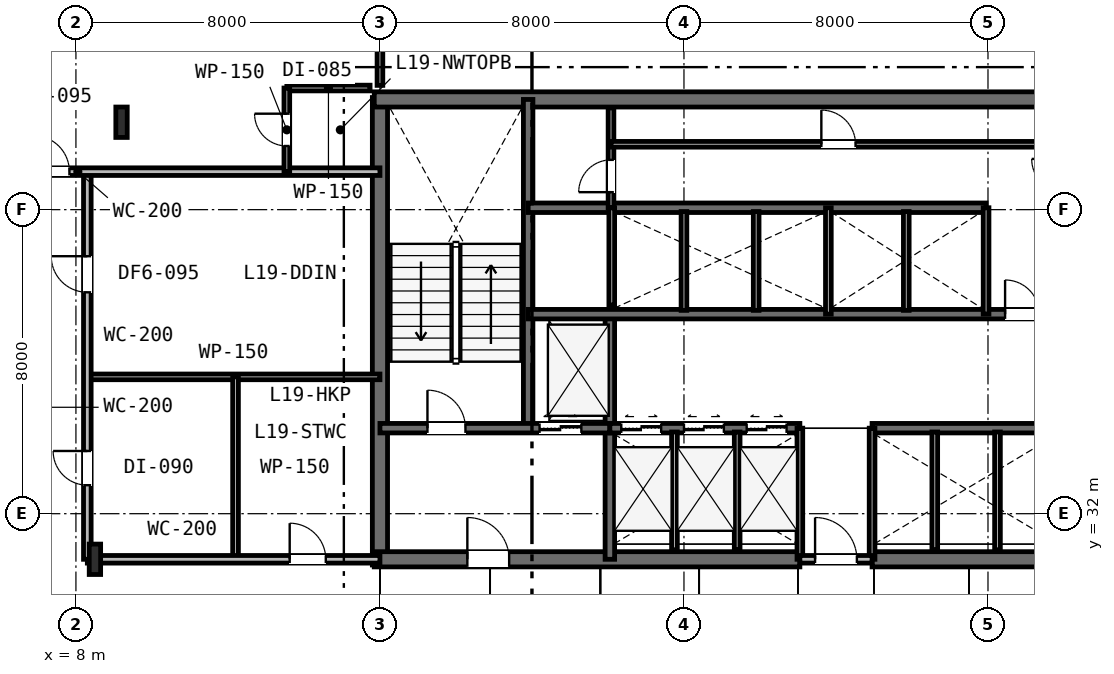
"""IFC4 building model, lengths in metres.
Left out: names, types, materials, properties, quantities, classifications, styles, units other than length and angle.
Written with IfcOpenShell. Run it as: python <this file> out.ifc"""

import sys

from ifc_helpers import new_model, si_unit, direction, frame, frame_2d, origin, origin_2d, place, context, subcontext, project, spatial, rectangle, i_section, extrude, element, fill, save


model = new_model("IFC4")
c1 = context("Model", 3, precision=1e-05, world=origin(), true_north=direction((0.0, 1.0)))
c2 = subcontext(c1, "Body", "Model", "MODEL_VIEW")
j1 = project(units=[si_unit("LENGTHUNIT", "METRE"), si_unit("PLANEANGLEUNIT", "RADIAN")], contexts=[c1])
p1 = place(None, origin())
s1 = spatial("IfcSite", under=j1, at=p1, CompositionType="ELEMENT")
p2 = place(p1, origin())
s2 = spatial("IfcBuilding", under=s1, at=p2, CompositionType="ELEMENT")
p3 = place(p2, frame((0.0, 0.0, 76.2)))
s3 = spatial("IfcBuildingStorey", under=s2, at=p3, CompositionType="ELEMENT", Elevation=76.2)
p4 = place(p3, frame((16.0, 30.65, 0.0), z_axis=(0.0, 0.0, 1.0), x_axis=(0.0, 1.0, 0.0)))
e1 = element("IfcWall", 1, at=p4, inside=s3, PredefinedType="SHEAR", context=c2, shape_type="SweptSolid", body=[
    extrude(rectangle(XDim=12.3, YDim=0.4, at=frame_2d((6.15, 0.0))), origin(), (0.0, 0.0, 1.0), 3.6),
])
p5 = place(p3, frame((15.85, 42.9, 0.0), z_axis=(0.0, 0.0, 1.0), x_axis=(1.0, 0.0, 0.0)))
e2 = element("IfcWall", 2, at=p5, inside=s3, PredefinedType="SHEAR", context=c2, shape_type="SweptSolid", body=[
    extrude(rectangle(XDim=24.3, YDim=0.4, at=frame_2d((12.15, 0.0))), origin(), (0.0, 0.0, 1.0), 3.6),
])
p6 = place(p3, frame((15.85, 30.8, 0.0), z_axis=(0.0, 0.0, 1.0), x_axis=(1.0, 0.0, 0.0)))
e3 = element("IfcWall", 3, at=p6, inside=s3, PredefinedType="SHEAR", context=c2, shape_type="SweptSolid", body=[
    extrude(rectangle(XDim=11.2, YDim=0.4, at=frame_2d((5.6, 0.0))), origin(), (0.0, 0.0, 1.0), 3.6),
])
p7 = place(p6, frame((2.45, 0.0, 0.0)))
e4 = element("IfcOpeningElement", 4, at=p7, cuts=e3, PredefinedType="OPENING", context=c2, shape_type="SweptSolid", body=[
    extrude(rectangle(XDim=1.1, YDim=2.15, at=frame_2d((0.55, 1.075))), frame((0.0, 0.21, 0.0), z_axis=(0.0, -1.0, 0.0), x_axis=(1.0, 0.0, 0.0)), (0.0, 0.0, 1.0), 0.42),
])
p8 = place(p3, frame((28.95, 30.8, 0.0), z_axis=(0.0, 0.0, 1.0), x_axis=(1.0, 0.0, 0.0)))
e5 = element("IfcWall", 5, at=p8, inside=s3, PredefinedType="SHEAR", context=c2, shape_type="SweptSolid", body=[
    extrude(rectangle(XDim=11.2, YDim=0.4, at=frame_2d((5.6, 0.0))), origin(), (0.0, 0.0, 1.0), 3.6),
])
p9 = place(p8, frame((7.65, 0.0, 0.0)))
e6 = element("IfcOpeningElement", 6, at=p9, cuts=e5, PredefinedType="OPENING", context=c2, shape_type="SweptSolid", body=[
    extrude(rectangle(XDim=1.1, YDim=2.15, at=frame_2d((0.55, 1.075))), frame((0.0, 0.21, 0.0), z_axis=(0.0, -1.0, 0.0), x_axis=(1.0, 0.0, 0.0)), (0.0, 0.0, 1.0), 0.42),
])
p10 = place(p3, frame((19.9, 34.25, 0.0), z_axis=(0.0, 0.0, 1.0), x_axis=(0.0, 1.0, 0.0)))
e7 = element("IfcWall", 7, at=p10, inside=s3, PredefinedType="SHEAR", context=c2, shape_type="SweptSolid", body=[
    extrude(rectangle(XDim=8.65, YDim=0.25, at=frame_2d((4.325, 0.0))), origin(), (0.0, 0.0, 1.0), 3.6),
])
p11 = place(p3, frame((22.05, 30.8, 0.0), z_axis=(0.0, 0.0, 1.0), x_axis=(0.0, 1.0, 0.0)))
e8 = element("IfcWall", 8, at=p11, inside=s3, PredefinedType="SHEAR", context=c2, shape_type="SweptSolid", body=[
    extrude(rectangle(XDim=6.45, YDim=0.25, at=frame_2d((3.225, 0.0))), origin(), (0.0, 0.0, 1.0), 3.6),
])
p12 = place(p3, frame((16.0, 34.25, 0.0), z_axis=(0.0, 0.0, 1.0), x_axis=(1.0, 0.0, 0.0)))
e9 = element("IfcWall", 9, at=p12, inside=s3, PredefinedType="SHEAR", context=c2, shape_type="SweptSolid", body=[
    extrude(rectangle(XDim=6.05, YDim=0.25, at=frame_2d((3.025, 0.0))), origin(), (0.0, 0.0, 1.0), 3.6),
])
p13 = place(p12, frame((1.25, 0.0, 0.0)))
e10 = element("IfcOpeningElement", 10, at=p13, cuts=e9, PredefinedType="OPENING", context=c2, shape_type="SweptSolid", body=[
    extrude(rectangle(XDim=1.0, YDim=2.15, at=frame_2d((0.5, 1.075))), frame((0.0, 0.135, 0.0), z_axis=(0.0, -1.0, 0.0), x_axis=(1.0, 0.0, 0.0)), (0.0, 0.0, 1.0), 0.27),
])
p14 = place(p12, frame((4.2, 0.0, 0.0)))
e11 = element("IfcOpeningElement", 11, at=p14, cuts=e9, PredefinedType="OPENING", context=c2, shape_type="SweptSolid", body=[
    extrude(rectangle(XDim=1.1, YDim=2.15, at=frame_2d((0.55, 1.075))), frame((0.0, 0.135, 0.0), z_axis=(0.0, -1.0, 0.0), x_axis=(1.0, 0.0, 0.0)), (0.0, 0.0, 1.0), 0.27),
])
p15 = place(p3, frame((22.05, 34.25, 0.0), z_axis=(0.0, 0.0, 1.0), x_axis=(1.0, 0.0, 0.0)))
e12 = element("IfcWall", 12, at=p15, inside=s3, PredefinedType="SHEAR", context=c2, shape_type="SweptSolid", body=[
    extrude(rectangle(XDim=5.0, YDim=0.25, at=frame_2d((2.5, 0.0))), origin(), (0.0, 0.0, 1.0), 3.6),
])
p16 = place(p15, frame((0.3, 0.0, 0.0)))
e13 = element("IfcOpeningElement", 13, at=p16, cuts=e12, PredefinedType="OPENING", context=c2, shape_type="SweptSolid", body=[
    extrude(rectangle(XDim=1.05, YDim=2.15, at=frame_2d((0.525, 1.075))), frame((0.0, 0.135, 0.0), z_axis=(0.0, -1.0, 0.0), x_axis=(1.0, 0.0, 0.0)), (0.0, 0.0, 1.0), 0.27),
])
p17 = place(p15, frame((1.95, 0.0, 0.0)))
e14 = element("IfcOpeningElement", 14, at=p17, cuts=e12, PredefinedType="OPENING", context=c2, shape_type="SweptSolid", body=[
    extrude(rectangle(XDim=1.05, YDim=2.15, at=frame_2d((0.525, 1.075))), frame((0.0, 0.135, 0.0), z_axis=(0.0, -1.0, 0.0), x_axis=(1.0, 0.0, 0.0)), (0.0, 0.0, 1.0), 0.27),
])
p18 = place(p15, frame((3.6, 0.0, 0.0)))
e15 = element("IfcOpeningElement", 15, at=p18, cuts=e12, PredefinedType="OPENING", context=c2, shape_type="SweptSolid", body=[
    extrude(rectangle(XDim=1.05, YDim=2.15, at=frame_2d((0.525, 1.075))), frame((0.0, 0.135, 0.0), z_axis=(0.0, -1.0, 0.0), x_axis=(1.0, 0.0, 0.0)), (0.0, 0.0, 1.0), 0.27),
])
p19 = place(p3, frame((28.95, 34.25, 0.0), z_axis=(0.0, 0.0, 1.0), x_axis=(1.0, 0.0, 0.0)))
e16 = element("IfcWall", 16, at=p19, inside=s3, PredefinedType="SHEAR", context=c2, shape_type="SweptSolid", body=[
    extrude(rectangle(XDim=5.0, YDim=0.25, at=frame_2d((2.5, 0.0))), origin(), (0.0, 0.0, 1.0), 3.6),
])
p20 = place(p3, frame((19.9, 37.25, 0.0), z_axis=(0.0, 0.0, 1.0), x_axis=(1.0, 0.0, 0.0)))
e17 = element("IfcWall", 17, at=p20, inside=s3, PredefinedType="SHEAR", context=c2, shape_type="SweptSolid", body=[
    extrude(rectangle(XDim=16.2, YDim=0.25, at=frame_2d((8.1, 0.0))), origin(), (0.0, 0.0, 1.0), 3.6),
])
p21 = place(p20, frame((12.55, 0.0, 0.0)))
e18 = element("IfcOpeningElement", 18, at=p21, cuts=e17, PredefinedType="OPENING", context=c2, shape_type="SweptSolid", body=[
    extrude(rectangle(XDim=0.9, YDim=2.15, at=frame_2d((0.45, 1.075))), frame((0.0, 0.135, 0.0), z_axis=(0.0, -1.0, 0.0), x_axis=(1.0, 0.0, 0.0)), (0.0, 0.0, 1.0), 0.27),
])
p22 = place(p3, frame((19.9, 40.05, 0.0), z_axis=(0.0, 0.0, 1.0), x_axis=(1.0, 0.0, 0.0)))
e19 = element("IfcWall", 19, at=p22, inside=s3, PredefinedType="SHEAR", context=c2, shape_type="SweptSolid", body=[
    extrude(rectangle(XDim=12.05, YDim=0.25, at=frame_2d((6.025, 0.0))), origin(), (0.0, 0.0, 1.0), 3.6),
])
for number, where, z_axis, x_axis in (
    (20, (8.5, 30.8, 0.0), (0.0, 0.0, 1.0), (1.0, 0.0, 0.0)),
    (21, (9.2, 42.3, 0.0), (0.0, 0.0, 1.0), (1.0, 0.0, 0.0)),
):
    element("IfcColumn", number, at=place(p3, frame(where, z_axis=z_axis, x_axis=x_axis)), inside=s3, PredefinedType="COLUMN", context=c2, shape_type="SweptSolid", body=[
        extrude(i_section(OverallWidth=0.3, OverallDepth=0.8, WebThickness=0.018, FlangeThickness=0.033, FilletRadius=0.03, at=origin_2d()), origin(), (0.0, 0.0, 1.0), 3.6),
    ])
for number, where, z_axis, x_axis in (
    (22, (27.05, 30.8, 0.0), (0.0, 0.0, 1.0), (0.0, 1.0, 0.0)),
    (23, (28.95, 30.8, 0.0), (0.0, 0.0, 1.0), (0.0, 1.0, 0.0)),
):
    element("IfcWall", number, at=place(p3, frame(where, z_axis=z_axis, x_axis=x_axis)), inside=s3, PredefinedType="PLUMBINGWALL", context=c2, shape_type="SweptSolid", body=[
        extrude(rectangle(XDim=3.45, YDim=0.15, at=frame_2d((1.725, 0.0))), origin(), (0.0, 0.0, 1.0), 3.24),
    ])
p23 = place(p3, frame((27.05, 30.8, 0.0), z_axis=(0.0, 0.0, 1.0), x_axis=(1.0, 0.0, 0.0)))
e24 = element("IfcWall", 24, at=p23, inside=s3, PredefinedType="PARTITIONING", context=c2, shape_type="SweptSolid", body=[
    extrude(rectangle(XDim=1.9, YDim=0.2, at=frame_2d((0.95, 0.0))), origin(), (0.0, 0.0, 1.0), 3.24),
])
p24 = place(p23, frame((0.4, 0.0, 0.0)))
e25 = element("IfcOpeningElement", 25, at=p24, cuts=e24, PredefinedType="OPENING", context=c2, shape_type="SweptSolid", body=[
    extrude(rectangle(XDim=1.1, YDim=2.15, at=frame_2d((0.55, 1.075))), frame((0.0, 0.11, 0.0), z_axis=(0.0, -1.0, 0.0), x_axis=(1.0, 0.0, 0.0)), (0.0, 0.0, 1.0), 0.22),
])
for number, where, z_axis, x_axis in (
    (26, (23.75, 31.05, 0.0), (0.0, 0.0, 1.0), (0.0, 1.0, 0.0)),
    (27, (25.4, 31.05, 0.0), (0.0, 0.0, 1.0), (0.0, 1.0, 0.0)),
    (28, (30.6, 31.05, 0.0), (0.0, 0.0, 1.0), (0.0, 1.0, 0.0)),
    (29, (32.25, 31.05, 0.0), (0.0, 0.0, 1.0), (0.0, 1.0, 0.0)),
):
    element("IfcWall", number, at=place(p3, frame(where, z_axis=z_axis, x_axis=x_axis)), inside=s3, PredefinedType="PLUMBINGWALL", context=c2, shape_type="SweptSolid", body=[
        extrude(rectangle(XDim=3.1, YDim=0.15, at=frame_2d((1.55, 0.0))), origin(), (0.0, 0.0, 1.0), 3.24),
    ])
p25 = place(p3, frame((22.1, 37.49, 0.0), z_axis=(0.0, 0.0, 1.0), x_axis=(0.0, 1.0, 0.0)))
e30 = element("IfcWall", 30, at=p25, inside=s3, PredefinedType="PLUMBINGWALL", context=c2, shape_type="SweptSolid", body=[
    extrude(rectangle(XDim=2.56, YDim=0.15, at=frame_2d((1.28, 0.0))), origin(), (0.0, 0.0, 1.0), 3.24),
])
p26 = place(p3, frame((27.8, 37.25, 0.0), z_axis=(0.0, 0.0, 1.0), x_axis=(0.0, 1.0, 0.0)))
e31 = element("IfcWall", 31, at=p26, inside=s3, PredefinedType="PLUMBINGWALL", context=c2, shape_type="SweptSolid", body=[
    extrude(rectangle(XDim=2.8, YDim=0.15, at=frame_2d((1.4, 0.0))), origin(), (0.0, 0.0, 1.0), 3.24),
])
for number, where, z_axis, x_axis in (
    (32, (24.0, 37.35, 0.0), (0.0, 0.0, 1.0), (0.0, 1.0, 0.0)),
    (33, (25.9, 37.35, 0.0), (0.0, 0.0, 1.0), (0.0, 1.0, 0.0)),
):
    element("IfcWall", number, at=place(p3, frame(where, z_axis=z_axis, x_axis=x_axis)), inside=s3, PredefinedType="PLUMBINGWALL", context=c2, shape_type="SweptSolid", body=[
        extrude(rectangle(XDim=2.6, YDim=0.15, at=frame_2d((1.3, 0.0))), origin(), (0.0, 0.0, 1.0), 3.24),
    ])
p27 = place(p3, frame((31.95, 37.25, 0.0), z_axis=(0.0, 0.0, 1.0), x_axis=(0.0, 1.0, 0.0)))
e34 = element("IfcWall", 34, at=p27, inside=s3, PredefinedType="PLUMBINGWALL", context=c2, shape_type="SweptSolid", body=[
    extrude(rectangle(XDim=2.8, YDim=0.15, at=frame_2d((1.4, 0.0))), origin(), (0.0, 0.0, 1.0), 3.24),
])
p28 = place(p3, frame((29.85, 37.35, 0.0), z_axis=(0.0, 0.0, 1.0), x_axis=(0.0, 1.0, 0.0)))
e35 = element("IfcWall", 35, at=p28, inside=s3, PredefinedType="PLUMBINGWALL", context=c2, shape_type="SweptSolid", body=[
    extrude(rectangle(XDim=2.6, YDim=0.15, at=frame_2d((1.3, 0.0))), origin(), (0.0, 0.0, 1.0), 3.24),
])
p29 = place(p3, frame((22.08, 40.05, 0.0), z_axis=(0.0, 0.0, 1.0), x_axis=(0.0, 1.0, 0.0)))
e36 = element("IfcWall", 36, at=p29, inside=s3, PredefinedType="PARTITIONING", context=c2, shape_type="SweptSolid", body=[
    extrude(rectangle(XDim=2.63, YDim=0.15, at=frame_2d((1.315, 0.0))), origin(), (0.0, 0.0, 1.0), 3.24),
])
p30 = place(p29, frame((0.41, 0.0, 0.0)))
e37 = element("IfcOpeningElement", 37, at=p30, cuts=e36, PredefinedType="OPENING", context=c2, shape_type="SweptSolid", body=[
    extrude(rectangle(XDim=0.85, YDim=2.15, at=frame_2d((0.425, 1.075))), frame((0.0, 0.085, 0.0), z_axis=(0.0, -1.0, 0.0), x_axis=(1.0, 0.0, 0.0)), (0.0, 0.0, 1.0), 0.17),
])
p31 = place(p3, frame((22.08, 41.72, 0.0), z_axis=(0.0, 0.0, 1.0), x_axis=(1.0, 0.0, 0.0)))
e38 = element("IfcWall", 38, at=p31, inside=s3, PredefinedType="PARTITIONING", context=c2, shape_type="SweptSolid", body=[
    extrude(rectangle(XDim=11.97, YDim=0.15, at=frame_2d((5.985, 0.0))), origin(), (0.0, 0.0, 1.0), 3.24),
])
p32 = place(p31, frame((5.535, 0.0, 0.0)))
e39 = element("IfcOpeningElement", 39, at=p32, cuts=e38, PredefinedType="OPENING", context=c2, shape_type="SweptSolid", body=[
    extrude(rectangle(XDim=0.9, YDim=2.15, at=frame_2d((0.45, 1.075))), frame((0.0, 0.085, 0.0), z_axis=(0.0, -1.0, 0.0), x_axis=(1.0, 0.0, 0.0)), (0.0, 0.0, 1.0), 0.17),
])
p33 = place(p3, frame((8.3, 35.6, 0.0), z_axis=(0.0, 0.0, 1.0), x_axis=(1.0, 0.0, 0.0)))
e40 = element("IfcWall", 40, at=p33, inside=s3, PredefinedType="PARTITIONING", context=c2, shape_type="SweptSolid", body=[
    extrude(rectangle(XDim=7.7, YDim=0.15, at=frame_2d((3.85, 0.0))), origin(), (0.0, 0.0, 1.0), 2.74),
])
p34 = place(p3, frame((12.2, 30.8, 0.0), z_axis=(0.0, 0.0, 1.0), x_axis=(0.0, 1.0, 0.0)))
e41 = element("IfcWall", 41, at=p34, inside=s3, PredefinedType="PARTITIONING", context=c2, shape_type="SweptSolid", body=[
    extrude(rectangle(XDim=4.8, YDim=0.15, at=frame_2d((2.4, 0.0))), origin(), (0.0, 0.0, 1.0), 2.74),
])
p35 = place(p3, frame((8.3, 30.8, 0.0), z_axis=(0.0, 0.0, 1.0), x_axis=(1.0, 0.0, 0.0)))
e42 = element("IfcWall", 42, at=p35, inside=s3, PredefinedType="PARTITIONING", context=c2, shape_type="SweptSolid", body=[
    extrude(rectangle(XDim=7.7, YDim=0.2, at=frame_2d((3.85, 0.0))), origin(), (0.0, 0.0, 1.0), 2.74),
])
p36 = place(p35, frame((5.325, 0.0, 0.0)))
e43 = element("IfcOpeningElement", 43, at=p36, cuts=e42, PredefinedType="OPENING", context=c2, shape_type="SweptSolid", body=[
    extrude(rectangle(XDim=0.95, YDim=2.15, at=frame_2d((0.475, 1.075))), frame((0.0, 0.11, 0.0), z_axis=(0.0, -1.0, 0.0), x_axis=(1.0, 0.0, 0.0)), (0.0, 0.0, 1.0), 0.22),
])
p37 = place(p3, frame((8.3, 30.8, 0.0), z_axis=(0.0, 0.0, 1.0), x_axis=(0.0, 1.0, 0.0)))
e44 = element("IfcWall", 44, at=p37, inside=s3, PredefinedType="PARTITIONING", context=c2, shape_type="SweptSolid", body=[
    extrude(rectangle(XDim=10.2, YDim=0.2, at=frame_2d((5.1, 0.0))), origin(), (0.0, 0.0, 1.0), 2.74),
])
p38 = place(p37, frame((1.95, 0.0, 0.0)))
e45 = element("IfcOpeningElement", 45, at=p38, cuts=e44, PredefinedType="OPENING", context=c2, shape_type="SweptSolid", body=[
    extrude(rectangle(XDim=0.9, YDim=2.15, at=frame_2d((0.45, 1.075))), frame((0.0, 0.11, 0.0), z_axis=(0.0, -1.0, 0.0), x_axis=(1.0, 0.0, 0.0)), (0.0, 0.0, 1.0), 0.22),
])
p39 = place(p37, frame((7.025, 0.0, 0.0)))
e46 = element("IfcOpeningElement", 46, at=p39, cuts=e44, PredefinedType="OPENING", context=c2, shape_type="SweptSolid", body=[
    extrude(rectangle(XDim=0.95, YDim=2.15, at=frame_2d((0.475, 1.075))), frame((0.0, 0.11, 0.0), z_axis=(0.0, -1.0, 0.0), x_axis=(1.0, 0.0, 0.0)), (0.0, 0.0, 1.0), 0.22),
])
p40 = place(p3, frame((0.1, 41.0, 0.0), z_axis=(0.0, 0.0, 1.0), x_axis=(1.0, 0.0, 0.0)))
e47 = element("IfcWall", 47, at=p40, inside=s3, PredefinedType="PARTITIONING", context=c2, shape_type="SweptSolid", body=[
    extrude(rectangle(XDim=15.9, YDim=0.2, at=frame_2d((7.95, 0.0))), origin(), (0.0, 0.0, 1.0), 2.74),
])
p41 = place(p40, frame((6.779, 0.0, 0.0)))
e48 = element("IfcOpeningElement", 48, at=p41, cuts=e47, PredefinedType="OPENING", context=c2, shape_type="SweptSolid", body=[
    extrude(rectangle(XDim=0.95, YDim=2.15, at=frame_2d((0.475, 1.075))), frame((0.0, 0.11, 0.0), z_axis=(0.0, -1.0, 0.0), x_axis=(1.0, 0.0, 0.0)), (0.0, 0.0, 1.0), 0.22),
])
p42 = place(p3, frame((13.55, 43.2, 0.0), z_axis=(0.0, 0.0, 1.0), x_axis=(1.0, 0.0, 0.0)))
e49 = element("IfcWall", 49, at=p42, inside=s3, PredefinedType="PARTITIONING", context=c2, shape_type="SweptSolid", body=[
    extrude(rectangle(XDim=2.19, YDim=0.15, at=frame_2d((1.095, 0.0))), origin(), (0.0, 0.0, 1.0), 3.24),
])
p43 = place(p3, frame((13.55, 41.0, 0.0), z_axis=(0.0, 0.0, 1.0), x_axis=(0.0, 1.0, 0.0)))
e50 = element("IfcWall", 50, at=p43, inside=s3, PredefinedType="PARTITIONING", context=c2, shape_type="SweptSolid", body=[
    extrude(rectangle(XDim=2.2, YDim=0.15, at=frame_2d((1.1, 0.0))), origin(), (0.0, 0.0, 1.0), 3.24),
])
p44 = place(p43, frame((0.675, 0.0, 0.0)))
e51 = element("IfcOpeningElement", 51, at=p44, cuts=e50, PredefinedType="OPENING", context=c2, shape_type="SweptSolid", body=[
    extrude(rectangle(XDim=0.85, YDim=2.15, at=frame_2d((0.425, 1.075))), frame((0.0, 0.085, 0.0), z_axis=(0.0, -1.0, 0.0), x_axis=(1.0, 0.0, 0.0)), (0.0, 0.0, 1.0), 0.17),
])
p45 = place(p3, frame((16.0, 43.27, 0.0), z_axis=(0.0, 0.0, 1.0), x_axis=(0.0, 1.0, 0.0)))
e52 = element("IfcWall", 52, at=p45, inside=s3, PredefinedType="PARTITIONING", context=c2, shape_type="SweptSolid", body=[
    extrude(rectangle(XDim=4.63, YDim=0.15, at=frame_2d((2.315, 0.0))), origin(), (0.0, 0.0, 1.0), 2.83),
])
p46 = place(p24, origin())
e53 = element("IfcDoor", 53, at=p46, inside=s3, OperationType="SINGLE_SWING_LEFT", PredefinedType="DOOR", context=c2, shape_type="SweptSolid", body=[
    extrude(rectangle(XDim=1.1, YDim=2.15, at=frame_2d((0.55, 1.075))), frame((0.0, 0.025, 0.0), z_axis=(0.0, -1.0, 0.0), x_axis=(1.0, 0.0, 0.0)), (0.0, 0.0, 1.0), 0.05),
])
fill(e25, e53)
p47 = place(p13, origin())
e54 = element("IfcDoor", 54, at=p47, inside=s3, OperationType="SINGLE_SWING_LEFT", PredefinedType="DOOR", context=c2, shape_type="SweptSolid", body=[
    extrude(rectangle(XDim=1.0, YDim=2.15, at=frame_2d((0.5, 1.075))), frame((0.0, 0.025, 0.0), z_axis=(0.0, -1.0, 0.0), x_axis=(1.0, 0.0, 0.0)), (0.0, 0.0, 1.0), 0.05),
])
fill(e10, e54)
p48 = place(p7, origin())
e55 = element("IfcDoor", 55, at=p48, inside=s3, OperationType="SINGLE_SWING_LEFT", PredefinedType="DOOR", context=c2, shape_type="SweptSolid", body=[
    extrude(rectangle(XDim=1.1, YDim=2.15, at=frame_2d((0.55, 1.075))), frame((0.0, 0.025, 0.0), z_axis=(0.0, -1.0, 0.0), x_axis=(1.0, 0.0, 0.0)), (0.0, 0.0, 1.0), 0.05),
])
fill(e4, e55)
p49 = place(p21, origin())
e56 = element("IfcDoor", 56, at=p49, inside=s3, OperationType="SINGLE_SWING_LEFT", PredefinedType="DOOR", context=c2, shape_type="SweptSolid", body=[
    extrude(rectangle(XDim=0.9, YDim=2.15, at=frame_2d((0.45, 1.075))), frame((0.0, 0.025, 0.0), z_axis=(0.0, -1.0, 0.0), x_axis=(1.0, 0.0, 0.0)), (0.0, 0.0, 1.0), 0.05),
])
fill(e18, e56)
p50 = place(p30, origin())
e57 = element("IfcDoor", 57, at=p50, inside=s3, OperationType="SINGLE_SWING_LEFT", PredefinedType="DOOR", context=c2, shape_type="SweptSolid", body=[
    extrude(rectangle(XDim=0.85, YDim=2.15, at=frame_2d((0.425, 1.075))), frame((0.0, 0.025, 0.0), z_axis=(0.0, -1.0, 0.0), x_axis=(1.0, 0.0, 0.0)), (0.0, 0.0, 1.0), 0.05),
])
fill(e37, e57)
p51 = place(p32, origin())
e58 = element("IfcDoor", 58, at=p51, inside=s3, OperationType="SINGLE_SWING_LEFT", PredefinedType="DOOR", context=c2, shape_type="SweptSolid", body=[
    extrude(rectangle(XDim=0.9, YDim=2.15, at=frame_2d((0.45, 1.075))), frame((0.0, 0.025, 0.0), z_axis=(0.0, -1.0, 0.0), x_axis=(1.0, 0.0, 0.0)), (0.0, 0.0, 1.0), 0.05),
])
fill(e39, e58)
p52 = place(p36, origin())
e59 = element("IfcDoor", 59, at=p52, inside=s3, OperationType="SINGLE_SWING_LEFT", PredefinedType="DOOR", context=c2, shape_type="SweptSolid", body=[
    extrude(rectangle(XDim=0.95, YDim=2.15, at=frame_2d((0.475, 1.075))), frame((0.0, 0.025, 0.0), z_axis=(0.0, -1.0, 0.0), x_axis=(1.0, 0.0, 0.0)), (0.0, 0.0, 1.0), 0.05),
])
fill(e43, e59)
p53 = place(p38, origin())
e60 = element("IfcDoor", 60, at=p53, inside=s3, OperationType="SINGLE_SWING_RIGHT", PredefinedType="DOOR", context=c2, shape_type="SweptSolid", body=[
    extrude(rectangle(XDim=0.9, YDim=2.15, at=frame_2d((0.45, 1.075))), frame((0.0, 0.025, 0.0), z_axis=(0.0, -1.0, 0.0), x_axis=(1.0, 0.0, 0.0)), (0.0, 0.0, 1.0), 0.05),
])
fill(e45, e60)
p54 = place(p41, origin())
e61 = element("IfcDoor", 61, at=p54, inside=s3, OperationType="SINGLE_SWING_LEFT", PredefinedType="DOOR", context=c2, shape_type="SweptSolid", body=[
    extrude(rectangle(XDim=0.95, YDim=2.15, at=frame_2d((0.475, 1.075))), frame((0.0, 0.025, 0.0), z_axis=(0.0, -1.0, 0.0), x_axis=(1.0, 0.0, 0.0)), (0.0, 0.0, 1.0), 0.05),
])
fill(e48, e61)
p55 = place(p44, origin())
e62 = element("IfcDoor", 62, at=p55, inside=s3, OperationType="SINGLE_SWING_RIGHT", PredefinedType="DOOR", context=c2, shape_type="SweptSolid", body=[
    extrude(rectangle(XDim=0.85, YDim=2.15, at=frame_2d((0.425, 1.075))), frame((0.0, 0.025, 0.0), z_axis=(0.0, -1.0, 0.0), x_axis=(1.0, 0.0, 0.0)), (0.0, 0.0, 1.0), 0.05),
])
fill(e51, e62)
p56 = place(p39, origin())
e63 = element("IfcDoor", 63, at=p56, inside=s3, OperationType="SINGLE_SWING_RIGHT", PredefinedType="DOOR", context=c2, shape_type="SweptSolid", body=[
    extrude(rectangle(XDim=0.95, YDim=2.15, at=frame_2d((0.475, 1.075))), frame((0.0, 0.025, 0.0), z_axis=(0.0, -1.0, 0.0), x_axis=(1.0, 0.0, 0.0)), (0.0, 0.0, 1.0), 0.05),
])
fill(e46, e63)
p57 = place(p14, origin())
e64 = element("IfcDoor", 64, at=p57, inside=s3, OperationType="DOUBLE_DOOR_SLIDING", PredefinedType="DOOR", context=c2, shape_type="SweptSolid", body=[
    extrude(rectangle(XDim=1.1, YDim=2.15, at=frame_2d((0.55, 1.075))), frame((0.0, 0.025, 0.0), z_axis=(0.0, -1.0, 0.0), x_axis=(1.0, 0.0, 0.0)), (0.0, 0.0, 1.0), 0.05),
])
fill(e11, e64)
p58 = place(p16, origin())
e65 = element("IfcDoor", 65, at=p58, inside=s3, OperationType="DOUBLE_DOOR_SLIDING", PredefinedType="DOOR", context=c2, shape_type="SweptSolid", body=[
    extrude(rectangle(XDim=1.05, YDim=2.15, at=frame_2d((0.525, 1.075))), frame((0.0, 0.025, 0.0), z_axis=(0.0, -1.0, 0.0), x_axis=(1.0, 0.0, 0.0)), (0.0, 0.0, 1.0), 0.05),
])
fill(e13, e65)
p59 = place(p17, origin())
e66 = element("IfcDoor", 66, at=p59, inside=s3, OperationType="DOUBLE_DOOR_SLIDING", PredefinedType="DOOR", context=c2, shape_type="SweptSolid", body=[
    extrude(rectangle(XDim=1.05, YDim=2.15, at=frame_2d((0.525, 1.075))), frame((0.0, 0.025, 0.0), z_axis=(0.0, -1.0, 0.0), x_axis=(1.0, 0.0, 0.0)), (0.0, 0.0, 1.0), 0.05),
])
fill(e14, e66)
p60 = place(p18, origin())
e67 = element("IfcDoor", 67, at=p60, inside=s3, OperationType="DOUBLE_DOOR_SLIDING", PredefinedType="DOOR", context=c2, shape_type="SweptSolid", body=[
    extrude(rectangle(XDim=1.05, YDim=2.15, at=frame_2d((0.525, 1.075))), frame((0.0, 0.025, 0.0), z_axis=(0.0, -1.0, 0.0), x_axis=(1.0, 0.0, 0.0)), (0.0, 0.0, 1.0), 0.05),
])
fill(e15, e67)
save(model, sys.argv[1])
